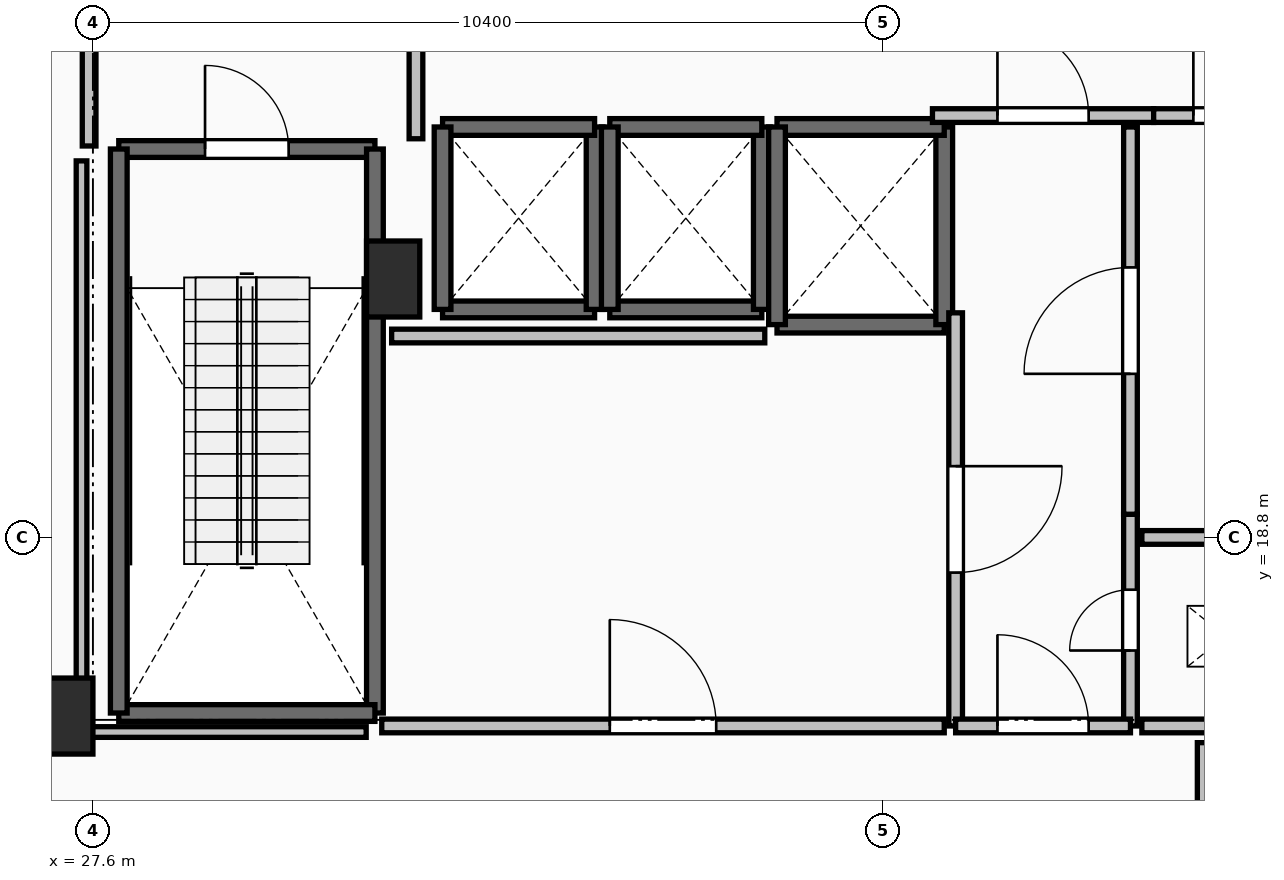
"""IFC4 building model, lengths in metres.
Left out: names, types, materials, properties, quantities, classifications, styles, units other than length and angle.
Written with IfcOpenShell. Run it as: python <this file> out.ifc"""

import sys

from ifc_helpers import new_model, si_unit, direction, frame, frame_2d, origin, origin_2d, place, context, subcontext, project, spatial, rectangle, extrude, element, fill, save


model = new_model("IFC4")
c1 = context("Model", 3, precision=1e-05, world=origin(), true_north=direction((0.0, 1.0)))
c2 = subcontext(c1, "Body", "Model", "MODEL_VIEW")
j1 = project(units=[si_unit("LENGTHUNIT", "METRE"), si_unit("PLANEANGLEUNIT", "RADIAN")], contexts=[c1])
p1 = place(None, origin())
s1 = spatial("IfcSite", under=j1, at=p1, CompositionType="ELEMENT")
p2 = place(p1, origin())
s2 = spatial("IfcBuilding", under=s1, at=p2, CompositionType="ELEMENT")
p3 = place(p2, frame((0.0, 0.0, 224.95)))
s3 = spatial("IfcBuildingStorey", under=s2, at=p3, CompositionType="ELEMENT", Elevation=224.95)
for number, where, z_axis, x_axis in (
    (1, (27.25, 16.45, 0.0), (0.0, 0.0, 1.0), (1.0, 0.0, 0.0)),
    (2, (31.55, 22.2, 0.0), (0.0, 0.0, 1.0), (1.0, 0.0, 0.0)),
):
    element("IfcColumn", number, at=place(p3, frame(where, z_axis=z_axis, x_axis=x_axis)), inside=s3, PredefinedType="PILASTER", context=c2, shape_type="SweptSolid", body=[
        extrude(rectangle(XDim=0.7, YDim=1.0, at=origin_2d()), origin(), (0.0, 0.0, 1.0), 4.8),
    ])
p4 = place(p3, frame((27.94, 23.91, 0.0), z_axis=(0.0, 0.0, 1.0), x_axis=(1.0, 0.0, 0.0)))
e3 = element("IfcWall", 3, at=p4, inside=s3, PredefinedType="SOLIDWALL", context=c2, shape_type="SweptSolid", body=[
    extrude(rectangle(XDim=3.37, YDim=0.22, at=frame_2d((1.685, 0.0))), origin(), (0.0, 0.0, 1.0), 4.5),
])
p5 = place(p4, frame((1.135, 0.0, 0.0)))
e4 = element("IfcOpeningElement", 4, at=p5, cuts=e3, PredefinedType="OPENING", context=c2, shape_type="SweptSolid", body=[
    extrude(rectangle(XDim=1.1, YDim=2.15, at=frame_2d((0.55, 1.075))), frame((0.0, 0.125, 0.0), z_axis=(0.0, -1.0, 0.0), x_axis=(1.0, 0.0, 0.0)), (0.0, 0.0, 1.0), 0.25),
])
p6 = place(p3, frame((31.31, 23.91, 0.0), z_axis=(0.0, 0.0, 1.0), x_axis=(0.0, -1.0, 0.0)))
e5 = element("IfcWall", 5, at=p6, inside=s3, PredefinedType="SOLIDWALL", context=c2, shape_type="SweptSolid", body=[
    extrude(rectangle(XDim=7.42, YDim=0.22, at=frame_2d((3.71, 0.0))), origin(), (0.0, 0.0, 1.0), 4.5),
])
p7 = place(p3, frame((31.31, 16.49, 0.0), z_axis=(0.0, 0.0, 1.0), x_axis=(-1.0, 0.0, 0.0)))
e6 = element("IfcWall", 6, at=p7, inside=s3, PredefinedType="SOLIDWALL", context=c2, shape_type="SweptSolid", body=[
    extrude(rectangle(XDim=3.37, YDim=0.22, at=frame_2d((1.685, 0.0))), origin(), (0.0, 0.0, 1.0), 4.5),
])
p8 = place(p3, frame((27.94, 16.49, 0.0), z_axis=(0.0, 0.0, 1.0), x_axis=(0.0, 1.0, 0.0)))
e7 = element("IfcWall", 7, at=p8, inside=s3, PredefinedType="SOLIDWALL", context=c2, shape_type="SweptSolid", body=[
    extrude(rectangle(XDim=7.42, YDim=0.22, at=frame_2d((3.71, 0.0))), origin(), (0.0, 0.0, 1.0), 4.5),
])
p9 = place(p3, frame((32.2, 21.8, 0.0), z_axis=(0.0, 0.0, 1.0), x_axis=(1.0, 0.0, 0.0)))
e8 = element("IfcWall", 8, at=p9, inside=s3, PredefinedType="SOLIDWALL", context=c2, shape_type="SweptSolid", body=[
    extrude(rectangle(XDim=2.0, YDim=0.22, at=frame_2d((1.0, 0.0))), origin(), (0.0, 0.0, 1.0), 4.5),
])
p10 = place(p3, frame((34.2, 21.8, 0.0), z_axis=(0.0, 0.0, 1.0), x_axis=(0.0, 1.0, 0.0)))
e9 = element("IfcWall", 9, at=p10, inside=s3, PredefinedType="SOLIDWALL", context=c2, shape_type="SweptSolid", body=[
    extrude(rectangle(XDim=2.4, YDim=0.22, at=frame_2d((1.2, 0.0))), origin(), (0.0, 0.0, 1.0), 4.5),
])
p11 = place(p3, frame((34.2, 24.2, 0.0), z_axis=(0.0, 0.0, 1.0), x_axis=(-1.0, 0.0, 0.0)))
e10 = element("IfcWall", 10, at=p11, inside=s3, PredefinedType="SOLIDWALL", context=c2, shape_type="SweptSolid", body=[
    extrude(rectangle(XDim=2.0, YDim=0.22, at=frame_2d((1.0, 0.0))), origin(), (0.0, 0.0, 1.0), 4.5),
])
p12 = place(p3, frame((32.2, 24.2, 0.0), z_axis=(0.0, 0.0, 1.0), x_axis=(0.0, -1.0, 0.0)))
e11 = element("IfcWall", 11, at=p12, inside=s3, PredefinedType="SOLIDWALL", context=c2, shape_type="SweptSolid", body=[
    extrude(rectangle(XDim=2.4, YDim=0.22, at=frame_2d((1.2, 0.0))), origin(), (0.0, 0.0, 1.0), 4.5),
])
p13 = place(p3, frame((34.4, 21.8, 0.0), z_axis=(0.0, 0.0, 1.0), x_axis=(1.0, 0.0, 0.0)))
e12 = element("IfcWall", 12, at=p13, inside=s3, PredefinedType="SOLIDWALL", context=c2, shape_type="SweptSolid", body=[
    extrude(rectangle(XDim=2.0, YDim=0.22, at=frame_2d((1.0, 0.0))), origin(), (0.0, 0.0, 1.0), 4.5),
])
p14 = place(p3, frame((36.4, 21.8, 0.0), z_axis=(0.0, 0.0, 1.0), x_axis=(0.0, 1.0, 0.0)))
e13 = element("IfcWall", 13, at=p14, inside=s3, PredefinedType="SOLIDWALL", context=c2, shape_type="SweptSolid", body=[
    extrude(rectangle(XDim=2.4, YDim=0.22, at=frame_2d((1.2, 0.0))), origin(), (0.0, 0.0, 1.0), 4.5),
])
p15 = place(p3, frame((36.4, 24.2, 0.0), z_axis=(0.0, 0.0, 1.0), x_axis=(-1.0, 0.0, 0.0)))
e14 = element("IfcWall", 14, at=p15, inside=s3, PredefinedType="SOLIDWALL", context=c2, shape_type="SweptSolid", body=[
    extrude(rectangle(XDim=2.0, YDim=0.22, at=frame_2d((1.0, 0.0))), origin(), (0.0, 0.0, 1.0), 4.5),
])
p16 = place(p3, frame((34.4, 24.2, 0.0), z_axis=(0.0, 0.0, 1.0), x_axis=(0.0, -1.0, 0.0)))
e15 = element("IfcWall", 15, at=p16, inside=s3, PredefinedType="SOLIDWALL", context=c2, shape_type="SweptSolid", body=[
    extrude(rectangle(XDim=2.4, YDim=0.22, at=frame_2d((1.2, 0.0))), origin(), (0.0, 0.0, 1.0), 4.5),
])
p17 = place(p3, frame((36.6, 21.6, 0.0), z_axis=(0.0, 0.0, 1.0), x_axis=(1.0, 0.0, 0.0)))
e16 = element("IfcWall", 16, at=p17, inside=s3, PredefinedType="SOLIDWALL", context=c2, shape_type="SweptSolid", body=[
    extrude(rectangle(XDim=2.2, YDim=0.22, at=frame_2d((1.1, 0.0))), origin(), (0.0, 0.0, 1.0), 4.5),
])
p18 = place(p3, frame((38.8, 21.6, 0.0), z_axis=(0.0, 0.0, 1.0), x_axis=(0.0, 1.0, 0.0)))
e17 = element("IfcWall", 17, at=p18, inside=s3, PredefinedType="SOLIDWALL", context=c2, shape_type="SweptSolid", body=[
    extrude(rectangle(XDim=2.6, YDim=0.22, at=frame_2d((1.3, 0.0))), origin(), (0.0, 0.0, 1.0), 4.5),
])
p19 = place(p3, frame((38.8, 24.2, 0.0), z_axis=(0.0, 0.0, 1.0), x_axis=(-1.0, 0.0, 0.0)))
e18 = element("IfcWall", 18, at=p19, inside=s3, PredefinedType="SOLIDWALL", context=c2, shape_type="SweptSolid", body=[
    extrude(rectangle(XDim=2.2, YDim=0.22, at=frame_2d((1.1, 0.0))), origin(), (0.0, 0.0, 1.0), 4.5),
])
p20 = place(p3, frame((36.6, 24.2, 0.0), z_axis=(0.0, 0.0, 1.0), x_axis=(0.0, -1.0, 0.0)))
e19 = element("IfcWall", 19, at=p20, inside=s3, PredefinedType="SOLIDWALL", context=c2, shape_type="SweptSolid", body=[
    extrude(rectangle(XDim=2.6, YDim=0.22, at=frame_2d((1.3, 0.0))), origin(), (0.0, 0.0, 1.0), 4.5),
])
p21 = place(p3, frame((31.85, 24.045, 0.0), z_axis=(0.0, 0.0, 1.0), x_axis=(0.0, 1.0, 0.0)))
e20 = element("IfcWall", 20, at=p21, inside=s3, PredefinedType="PARTITIONING", context=c2, shape_type="SweptSolid", body=[
    extrude(rectangle(XDim=3.91, YDim=0.18, at=frame_2d((1.955, 0.0))), origin(), (0.0, 0.0, 1.0), 4.5),
])
p22 = place(p21, frame((1.355, 0.0, 0.0)))
e21 = element("IfcOpeningElement", 21, at=p22, cuts=e20, PredefinedType="OPENING", context=c2, shape_type="SweptSolid", body=[
    extrude(rectangle(XDim=1.2, YDim=2.15, at=frame_2d((0.6, 1.075))), frame((0.0, 0.105, 0.0), z_axis=(0.0, -1.0, 0.0), x_axis=(1.0, 0.0, 0.0)), (0.0, 0.0, 1.0), 0.21),
])
p23 = place(p3, frame((27.55, 28.0, 0.0), z_axis=(0.0, 0.0, 1.0), x_axis=(0.0, -1.0, 0.0)))
e22 = element("IfcWall", 22, at=p23, inside=s3, PredefinedType="PARTITIONING", context=c2, shape_type="SweptSolid", body=[
    extrude(rectangle(XDim=4.05, YDim=0.18, at=frame_2d((2.025, 0.0))), origin(), (0.0, 0.0, 1.0), 3.482),
])
p24 = place(p23, frame((1.425, 0.0, 0.0)))
e23 = element("IfcOpeningElement", 23, at=p24, cuts=e22, PredefinedType="OPENING", context=c2, shape_type="SweptSolid", body=[
    extrude(rectangle(XDim=1.2, YDim=2.15, at=frame_2d((0.6, 1.075))), frame((0.0, 0.105, 0.0), z_axis=(0.0, -1.0, 0.0), x_axis=(1.0, 0.0, 0.0)), (0.0, 0.0, 1.0), 0.21),
])
p25 = place(p3, frame((38.645, 24.35, 0.0), z_axis=(0.0, 0.0, 1.0), x_axis=(1.0, 0.0, 0.0)))
e24 = element("IfcWall", 24, at=p25, inside=s3, PredefinedType="PARTITIONING", context=c2, shape_type="SweptSolid", body=[
    extrude(rectangle(XDim=2.91, YDim=0.18, at=frame_2d((1.455, 0.0))), origin(), (0.0, 0.0, 1.0), 4.5),
])
p26 = place(p25, frame((0.855, 0.0, 0.0)))
e25 = element("IfcOpeningElement", 25, at=p26, cuts=e24, PredefinedType="OPENING", context=c2, shape_type="SweptSolid", body=[
    extrude(rectangle(XDim=1.2, YDim=2.15, at=frame_2d((0.6, 1.075))), frame((0.0, 0.105, 0.0), z_axis=(0.0, -1.0, 0.0), x_axis=(1.0, 0.0, 0.0)), (0.0, 0.0, 1.0), 0.21),
])
p27 = place(p3, frame((41.555, 24.35, 0.0), z_axis=(0.0, 0.0, 1.0), x_axis=(1.0, 0.0, 0.0)))
e26 = element("IfcWall", 26, at=p27, inside=s3, PredefinedType="PARTITIONING", context=c2, shape_type="SweptSolid", body=[
    extrude(rectangle(XDim=2.445, YDim=0.18, at=frame_2d((1.223, 0.0))), origin(), (0.0, 0.0, 1.0), 4.5),
])
p28 = place(p27, frame((0.522, 0.0, 0.0)))
e27 = element("IfcOpeningElement", 27, at=p28, cuts=e26, PredefinedType="OPENING", context=c2, shape_type="SweptSolid", body=[
    extrude(rectangle(XDim=1.4, YDim=2.2, at=frame_2d((0.7, 1.1))), frame((0.0, 0.105, 0.0), z_axis=(0.0, -1.0, 0.0), x_axis=(1.0, 0.0, 0.0)), (0.0, 0.0, 1.0), 0.21),
])
p29 = place(p3, frame((38.95, 21.755, 0.0), z_axis=(0.0, 0.0, 1.0), x_axis=(0.0, -1.0, 0.0)))
e28 = element("IfcWall", 28, at=p29, inside=s3, PredefinedType="PARTITIONING", context=c2, shape_type="SweptSolid", body=[
    extrude(rectangle(XDim=5.435, YDim=0.18, at=frame_2d((2.717, 0.0))), origin(), (0.0, 0.0, 1.0), 4.5),
])
p30 = place(p29, frame((2.018, 0.0, 0.0)))
e29 = element("IfcOpeningElement", 29, at=p30, cuts=e28, PredefinedType="OPENING", context=c2, shape_type="SweptSolid", body=[
    extrude(rectangle(XDim=1.4, YDim=2.2, at=frame_2d((0.7, 1.1))), frame((0.0, 0.105, 0.0), z_axis=(0.0, -1.0, 0.0), x_axis=(1.0, 0.0, 0.0)), (0.0, 0.0, 1.0), 0.21),
])
p31 = place(p3, frame((41.25, 16.32, 0.0), z_axis=(0.0, 0.0, 1.0), x_axis=(0.0, 1.0, 0.0)))
e30 = element("IfcWall", 30, at=p31, inside=s3, PredefinedType="PARTITIONING", context=c2, shape_type="SweptSolid", body=[
    extrude(rectangle(XDim=2.785, YDim=0.18, at=frame_2d((1.393, 0.0))), origin(), (0.0, 0.0, 1.0), 4.5),
])
p32 = place(p31, frame((0.992, 0.0, 0.0)))
e31 = element("IfcOpeningElement", 31, at=p32, cuts=e30, PredefinedType="OPENING", context=c2, shape_type="SweptSolid", body=[
    extrude(rectangle(XDim=0.8, YDim=2.05, at=frame_2d((0.4, 1.025))), frame((0.0, 0.105, 0.0), z_axis=(0.0, -1.0, 0.0), x_axis=(1.0, 0.0, 0.0)), (0.0, 0.0, 1.0), 0.21),
])
p33 = place(p3, frame((41.25, 19.105, 0.0), z_axis=(0.0, 0.0, 1.0), x_axis=(0.0, 1.0, 0.0)))
e32 = element("IfcWall", 32, at=p33, inside=s3, PredefinedType="PARTITIONING", context=c2, shape_type="SweptSolid", body=[
    extrude(rectangle(XDim=5.095, YDim=0.18, at=frame_2d((2.547, 0.0))), origin(), (0.0, 0.0, 1.0), 3.482),
])
p34 = place(p33, frame((1.847, 0.0, 0.0)))
e33 = element("IfcOpeningElement", 33, at=p34, cuts=e32, PredefinedType="OPENING", context=c2, shape_type="SweptSolid", body=[
    extrude(rectangle(XDim=1.4, YDim=2.2, at=frame_2d((0.7, 1.1))), frame((0.0, 0.105, 0.0), z_axis=(0.0, -1.0, 0.0), x_axis=(1.0, 0.0, 0.0)), (0.0, 0.0, 1.0), 0.21),
])
p35 = place(p3, frame((38.95, 16.32, 0.0), z_axis=(0.0, 0.0, 1.0), x_axis=(1.0, 0.0, 0.0)))
e34 = element("IfcWall", 34, at=p35, inside=s3, PredefinedType="PARTITIONING", context=c2, shape_type="SweptSolid", body=[
    extrude(rectangle(XDim=2.3, YDim=0.18, at=frame_2d((1.15, 0.0))), origin(), (0.0, 0.0, 1.0), 4.5),
])
p36 = place(p35, frame((0.55, 0.0, 0.0)))
e35 = element("IfcOpeningElement", 35, at=p36, cuts=e34, PredefinedType="OPENING", context=c2, shape_type="SweptSolid", body=[
    extrude(rectangle(XDim=1.2, YDim=2.15, at=frame_2d((0.6, 1.075))), frame((0.0, 0.105, 0.0), z_axis=(0.0, -1.0, 0.0), x_axis=(1.0, 0.0, 0.0)), (0.0, 0.0, 1.0), 0.21),
])
p37 = place(p3, frame((31.4, 16.32, 0.0), z_axis=(0.0, 0.0, 1.0), x_axis=(1.0, 0.0, 0.0)))
e36 = element("IfcWall", 36, at=p37, inside=s3, PredefinedType="PARTITIONING", context=c2, shape_type="SweptSolid", body=[
    extrude(rectangle(XDim=7.4, YDim=0.18, at=frame_2d((3.7, 0.0))), origin(), (0.0, 0.0, 1.0), 4.5),
])
p38 = place(p37, frame((3.0, 0.0, 0.0)))
e37 = element("IfcOpeningElement", 37, at=p38, cuts=e36, PredefinedType="OPENING", context=c2, shape_type="SweptSolid", body=[
    extrude(rectangle(XDim=1.4, YDim=2.2, at=frame_2d((0.7, 1.1))), frame((0.0, 0.105, 0.0), z_axis=(0.0, -1.0, 0.0), x_axis=(1.0, 0.0, 0.0)), (0.0, 0.0, 1.0), 0.21),
])
p39 = place(p3, frame((44.6, 18.8, 0.0), z_axis=(0.0, 0.0, 1.0), x_axis=(-1.0, 0.0, 0.0)))
e38 = element("IfcWall", 38, at=p39, inside=s3, PredefinedType="PARTITIONING", context=c2, shape_type="SweptSolid", body=[
    extrude(rectangle(XDim=3.2, YDim=0.18, at=frame_2d((1.6, 0.0))), origin(), (0.0, 0.0, 1.0), 4.5),
])
p40 = place(p3, frame((41.4, 16.32, 0.0), z_axis=(0.0, 0.0, 1.0), x_axis=(1.0, 0.0, 0.0)))
e39 = element("IfcWall", 39, at=p40, inside=s3, PredefinedType="PARTITIONING", context=c2, shape_type="SweptSolid", body=[
    extrude(rectangle(XDim=3.2, YDim=0.18, at=frame_2d((1.6, 0.0))), origin(), (0.0, 0.0, 1.0), 4.5),
])
p41 = place(p40, frame((1.2, 0.0, 0.0)))
e40 = element("IfcOpeningElement", 40, at=p41, cuts=e39, PredefinedType="OPENING", context=c2, shape_type="SweptSolid", body=[
    extrude(rectangle(XDim=0.8, YDim=2.05, at=frame_2d((0.4, 1.025))), frame((0.0, 0.105, 0.0), z_axis=(0.0, -1.0, 0.0), x_axis=(1.0, 0.0, 0.0)), (0.0, 0.0, 1.0), 0.21),
])
p42 = place(p3, frame((36.439, 21.45, 0.0), z_axis=(0.0, 0.0, 1.0), x_axis=(-1.0, 0.0, 0.0)))
e41 = element("IfcWall", 41, at=p42, inside=s3, PredefinedType="PARTITIONING", context=c2, shape_type="SweptSolid", body=[
    extrude(rectangle(XDim=4.909, YDim=0.18, at=frame_2d((2.455, 0.0))), origin(), (0.0, 0.0, 1.0), 4.5),
])
p43 = place(p3, frame((27.45, 23.754, 0.0), z_axis=(0.0, 0.0, 1.0), x_axis=(0.0, -1.0, 0.0)))
e42 = element("IfcWall", 42, at=p43, inside=s3, PredefinedType="PARTITIONING", context=c2, shape_type="SweptSolid", body=[
    extrude(rectangle(XDim=7.514, YDim=0.14, at=frame_2d((3.757, 0.0))), origin(), (0.0, 0.0, 1.0), 3.482),
])
p44 = place(p3, frame((27.45, 16.24, 0.0), z_axis=(0.0, 0.0, 1.0), x_axis=(1.0, 0.0, 0.0)))
e43 = element("IfcWall", 43, at=p44, inside=s3, PredefinedType="PARTITIONING", context=c2, shape_type="SweptSolid", body=[
    extrude(rectangle(XDim=3.745, YDim=0.14, at=frame_2d((1.873, 0.0))), origin(), (0.0, 0.0, 1.0), 3.482),
])
p45 = place(p3, frame((42.2, 16.1, 0.0), z_axis=(0.0, 0.0, 1.0), x_axis=(0.0, -1.0, 0.0)))
e44 = element("IfcWall", 44, at=p45, inside=s3, PredefinedType="PARTITIONING", context=c2, shape_type="SweptSolid", body=[
    extrude(rectangle(XDim=1.83, YDim=0.14, at=frame_2d((0.915, 0.0))), origin(), (0.0, 0.0, 1.0), 4.5),
])
p46 = place(p5, origin())
e45 = element("IfcDoor", 45, at=p46, inside=s3, OperationType="SINGLE_SWING_LEFT", PredefinedType="DOOR", context=c2, shape_type="SweptSolid", body=[
    extrude(rectangle(XDim=1.1, YDim=2.15, at=frame_2d((0.55, 1.075))), frame((0.0, 0.025, 0.0), z_axis=(0.0, -1.0, 0.0), x_axis=(1.0, 0.0, 0.0)), (0.0, 0.0, 1.0), 0.05),
])
fill(e4, e45)
p47 = place(p26, origin())
e46 = element("IfcDoor", 46, at=p47, inside=s3, OperationType="SINGLE_SWING_LEFT", PredefinedType="DOOR", context=c2, shape_type="SweptSolid", body=[
    extrude(rectangle(XDim=1.2, YDim=2.15, at=frame_2d((0.6, 1.075))), frame((0.0, 0.025, 0.0), z_axis=(0.0, -1.0, 0.0), x_axis=(1.0, 0.0, 0.0)), (0.0, 0.0, 1.0), 0.05),
])
fill(e25, e46)
p48 = place(p28, origin())
e47 = element("IfcDoor", 47, at=p48, inside=s3, OperationType="DOUBLE_SWING_LEFT", PredefinedType="DOOR", context=c2, shape_type="SweptSolid", body=[
    extrude(rectangle(XDim=1.4, YDim=2.2, at=frame_2d((0.7, 1.1))), frame((0.0, 0.025, 0.0), z_axis=(0.0, -1.0, 0.0), x_axis=(1.0, 0.0, 0.0)), (0.0, 0.0, 1.0), 0.05),
])
fill(e27, e47)
p49 = place(p30, origin())
e48 = element("IfcDoor", 48, at=p49, inside=s3, OperationType="DOUBLE_SWING_LEFT", PredefinedType="DOOR", context=c2, shape_type="SweptSolid", body=[
    extrude(rectangle(XDim=1.4, YDim=2.2, at=frame_2d((0.7, 1.1))), frame((0.0, 0.025, 0.0), z_axis=(0.0, -1.0, 0.0), x_axis=(1.0, 0.0, 0.0)), (0.0, 0.0, 1.0), 0.05),
])
fill(e29, e48)
p50 = place(p32, origin())
e49 = element("IfcDoor", 49, at=p50, inside=s3, OperationType="SINGLE_SWING_LEFT", PredefinedType="DOOR", context=c2, shape_type="SweptSolid", body=[
    extrude(rectangle(XDim=0.8, YDim=2.05, at=frame_2d((0.4, 1.025))), frame((0.0, 0.025, 0.0), z_axis=(0.0, -1.0, 0.0), x_axis=(1.0, 0.0, 0.0)), (0.0, 0.0, 1.0), 0.05),
])
fill(e31, e49)
p51 = place(p34, origin())
e50 = element("IfcDoor", 50, at=p51, inside=s3, OperationType="DOUBLE_SWING_LEFT", PredefinedType="DOOR", context=c2, shape_type="SweptSolid", body=[
    extrude(rectangle(XDim=1.4, YDim=2.2, at=frame_2d((0.7, 1.1))), frame((0.0, 0.025, 0.0), z_axis=(0.0, -1.0, 0.0), x_axis=(1.0, 0.0, 0.0)), (0.0, 0.0, 1.0), 0.05),
])
fill(e33, e50)
p52 = place(p36, origin())
e51 = element("IfcDoor", 51, at=p52, inside=s3, OperationType="SINGLE_SWING_LEFT", PredefinedType="DOOR", context=c2, shape_type="SweptSolid", body=[
    extrude(rectangle(XDim=1.2, YDim=2.15, at=frame_2d((0.6, 1.075))), frame((0.0, 0.025, 0.0), z_axis=(0.0, -1.0, 0.0), x_axis=(1.0, 0.0, 0.0)), (0.0, 0.0, 1.0), 0.05),
])
fill(e35, e51)
p53 = place(p38, origin())
e52 = element("IfcDoor", 52, at=p53, inside=s3, OperationType="DOUBLE_SWING_LEFT", PredefinedType="DOOR", context=c2, shape_type="SweptSolid", body=[
    extrude(rectangle(XDim=1.4, YDim=2.2, at=frame_2d((0.7, 1.1))), frame((0.0, 0.025, 0.0), z_axis=(0.0, -1.0, 0.0), x_axis=(1.0, 0.0, 0.0)), (0.0, 0.0, 1.0), 0.05),
])
fill(e37, e52)
save(model, sys.argv[1])
